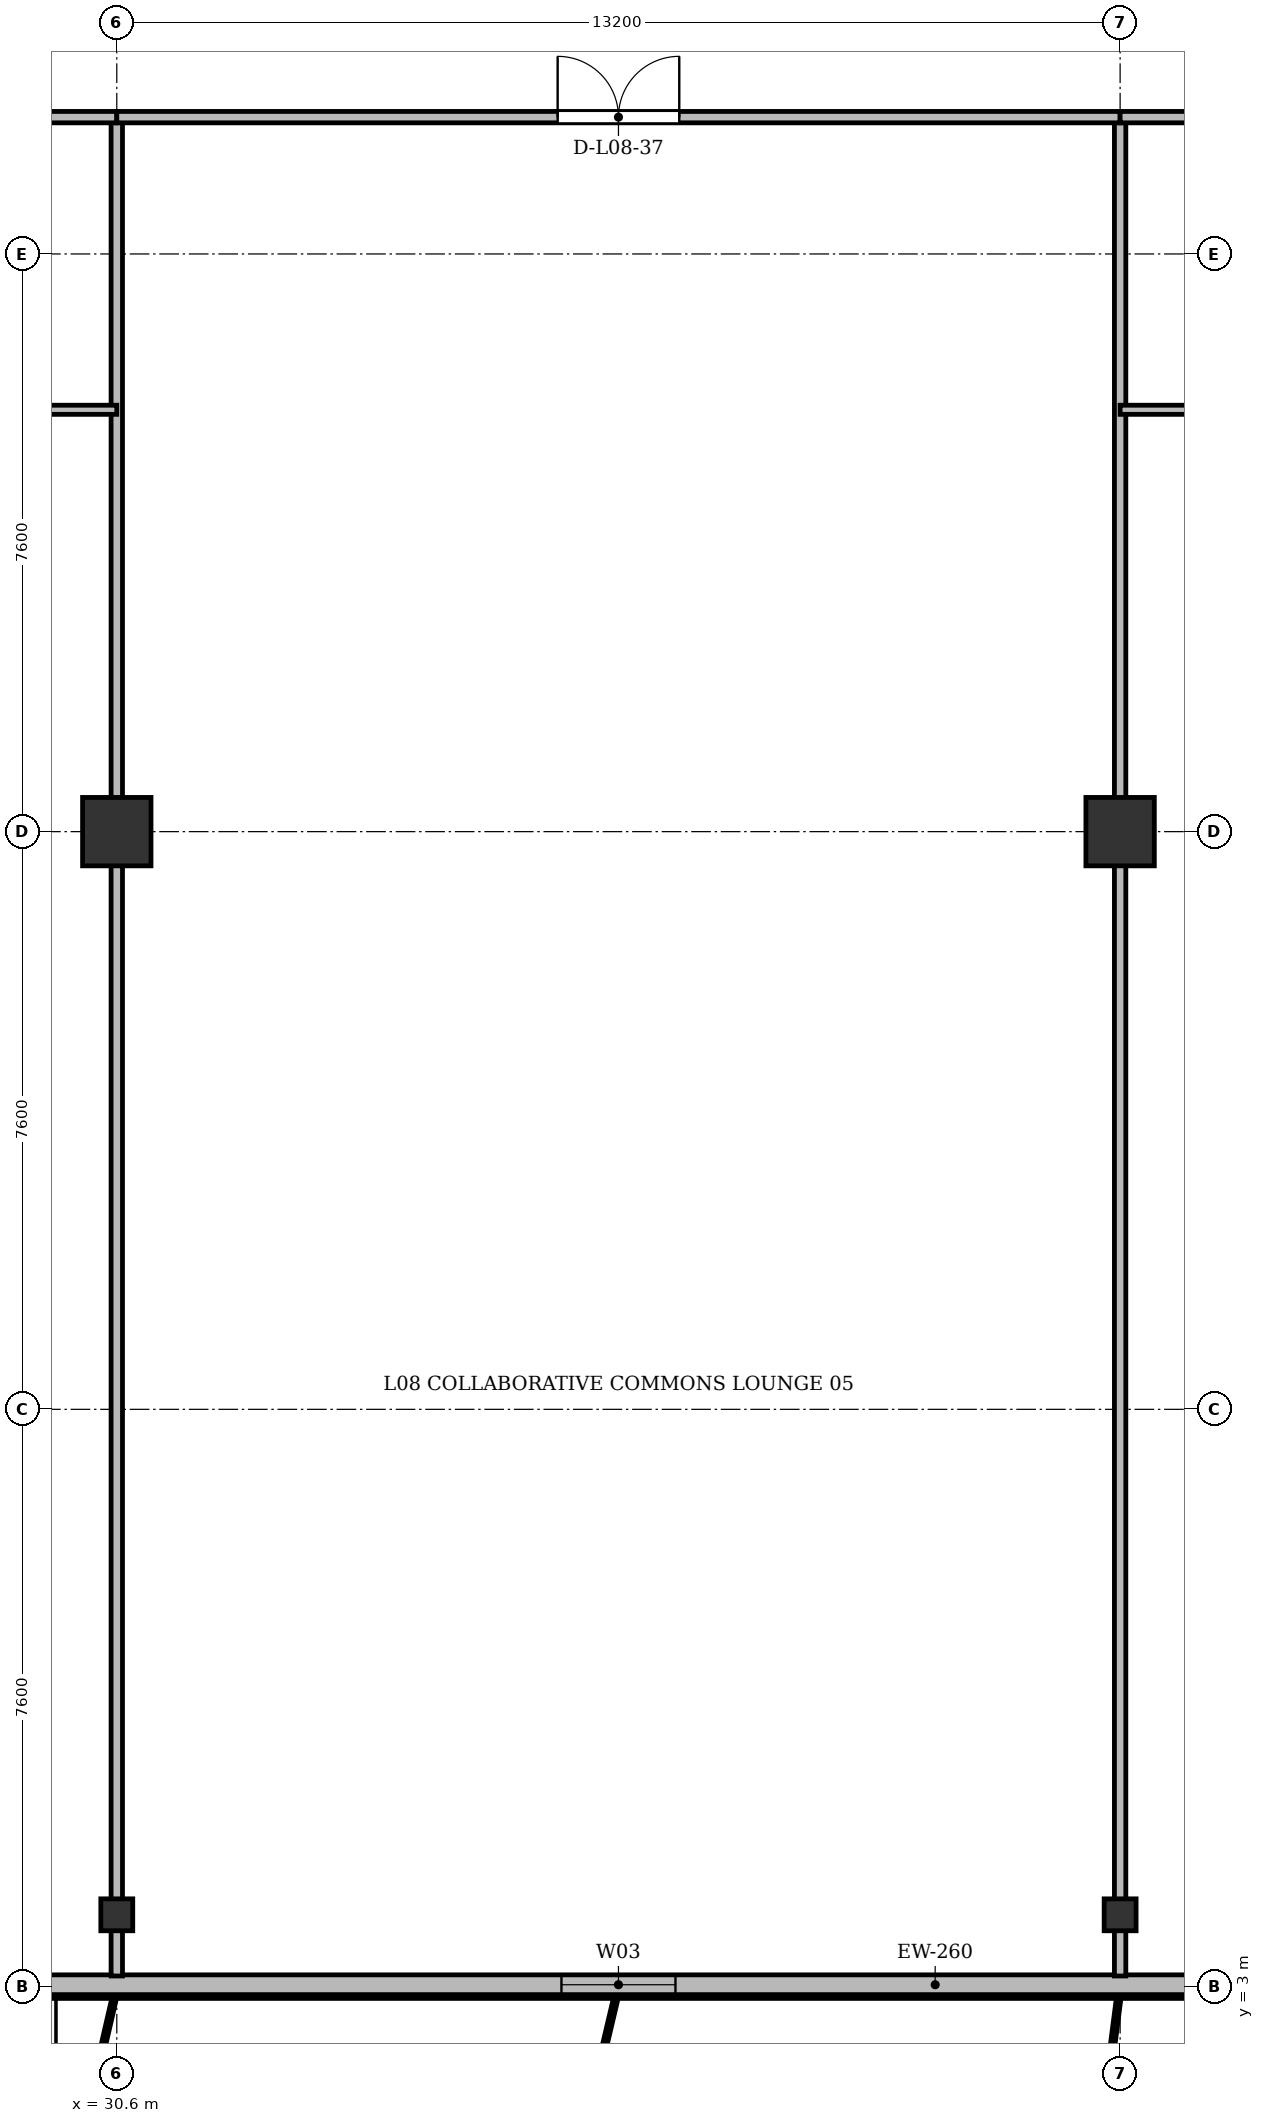
"""IFC4 building model, lengths in metres.
Left out: names, types, materials, properties, quantities, classifications, styles, units other than length and angle.
Written with IfcOpenShell. Run it as: python <this file> out.ifc"""

import sys

from ifc_helpers import new_model, si_unit, direction, frame, frame_2d, origin, origin_2d, place, context, subcontext, project, spatial, rectangle, i_section, extrude, source, transform, mapped, element, fill, save


model = new_model("IFC4")
c1 = context("Model", 3, precision=1e-05, world=origin(), true_north=direction((0.0, 1.0)))
c2 = subcontext(c1, "Body", "Model", "MODEL_VIEW")
j1 = project(units=[si_unit("LENGTHUNIT", "METRE"), si_unit("PLANEANGLEUNIT", "RADIAN")], contexts=[c1])
p1 = place(None, origin())
s1 = spatial("IfcSite", under=j1, at=p1, CompositionType="ELEMENT")
p2 = place(p1, origin())
s2 = spatial("IfcBuilding", under=s1, at=p2, CompositionType="ELEMENT")
p3 = place(p2, frame((0.0, 0.0, 34.3)))
s3 = spatial("IfcBuildingStorey", under=s2, at=p3, CompositionType="ELEMENT", Elevation=34.3)
m1 = source(origin(), c2, "Body", "SweptSolid", [
    extrude(i_section(OverallWidth=0.42, OverallDepth=0.42, WebThickness=0.026, FlangeThickness=0.04, at=origin_2d()), origin(), (0.0, 0.0, 1.0), 3.6),
])
p4 = place(p3, frame((30.6, 3.95, 0.0), z_axis=(0.0, 0.0, 1.0), x_axis=(1.0, 0.0, 0.0)))
e1 = element("IfcColumn", 1, at=p4, inside=s3, PredefinedType="COLUMN", context=c2, shape_type="MappedRepresentation", body=[
    mapped(m1, transform((0.0, 0.0, 0.0), x_axis=(1.0, 0.0, 0.0), y_axis=(0.0, 1.0, 0.0), z_axis=(0.0, 0.0, 1.0), scale=1.0)),
])
m2 = source(origin(), c2, "Body", "SweptSolid", [
    extrude(rectangle(XDim=0.9, YDim=0.9, at=origin_2d()), origin(), (0.0, 0.0, 1.0), 3.6),
])
p5 = place(p3, frame((30.6, 18.2, 0.0), z_axis=(0.0, 0.0, 1.0), x_axis=(1.0, 0.0, 0.0)))
e2 = element("IfcColumn", 2, at=p5, inside=s3, PredefinedType="COLUMN", context=c2, shape_type="MappedRepresentation", body=[
    mapped(m2, transform((0.0, 0.0, 0.0), x_axis=(1.0, 0.0, 0.0), y_axis=(0.0, 1.0, 0.0), z_axis=(0.0, 0.0, 1.0), scale=1.0)),
])
p6 = place(p3, frame((43.8, 3.95, 0.0), z_axis=(0.0, 0.0, 1.0), x_axis=(1.0, 0.0, 0.0)))
e3 = element("IfcColumn", 3, at=p6, inside=s3, PredefinedType="COLUMN", context=c2, shape_type="MappedRepresentation", body=[
    mapped(m1, transform((0.0, 0.0, 0.0), x_axis=(1.0, 0.0, 0.0), y_axis=(0.0, 1.0, 0.0), z_axis=(0.0, 0.0, 1.0), scale=1.0)),
])
p7 = place(p3, frame((43.8, 18.2, 0.0), z_axis=(0.0, 0.0, 1.0), x_axis=(1.0, 0.0, 0.0)))
e4 = element("IfcColumn", 4, at=p7, inside=s3, PredefinedType="COLUMN", context=c2, shape_type="MappedRepresentation", body=[
    mapped(m2, transform((0.0, 0.0, 0.0), x_axis=(1.0, 0.0, 0.0), y_axis=(0.0, 1.0, 0.0), z_axis=(0.0, 0.0, 1.0), scale=1.0)),
])
p8 = place(p3, frame((66.9, 3.03, 0.0), z_axis=(0.0, 0.0, 1.0), x_axis=(-1.0, 0.0, 0.0)))
e5 = element("IfcWall", 5, at=p8, inside=s3, PredefinedType="SOLIDWALL", context=c2, shape_type="SweptSolid", body=[
    extrude(rectangle(XDim=59.4, YDim=0.26, at=frame_2d((29.7, 0.0))), origin(), (0.0, 0.0, 1.0), 3.34),
])
p9 = place(p8, frame((3.875, 0.0, 0.9)))
e6 = element("IfcOpeningElement", 6, at=p9, cuts=e5, PredefinedType="OPENING", context=c2, shape_type="SweptSolid", body=[
    extrude(rectangle(XDim=1.65, YDim=1.85, at=frame_2d((0.825, 0.925))), frame((0.0, 0.14, 0.0), z_axis=(0.0, -1.0, 0.0), x_axis=(1.0, 0.0, 0.0)), (0.0, 0.0, 1.0), 0.28),
])
p10 = place(p8, frame((9.565, 0.0, 0.0)))
e7 = element("IfcOpeningElement", 7, at=p10, cuts=e5, PredefinedType="OPENING", context=c2, shape_type="SweptSolid", body=[
    extrude(rectangle(XDim=1.2, YDim=2.2, at=frame_2d((0.6, 1.1))), frame((0.0, 0.14, 0.0), z_axis=(0.0, -1.0, 0.0), x_axis=(1.0, 0.0, 0.0)), (0.0, 0.0, 1.0), 0.28),
])
p11 = place(p8, frame((18.4, 0.0, 0.9)))
e8 = element("IfcOpeningElement", 8, at=p11, cuts=e5, PredefinedType="OPENING", context=c2, shape_type="SweptSolid", body=[
    extrude(rectangle(XDim=2.2, YDim=1.8, at=frame_2d((1.1, 0.9))), frame((0.0, 0.14, 0.0), z_axis=(0.0, -1.0, 0.0), x_axis=(1.0, 0.0, 0.0)), (0.0, 0.0, 1.0), 0.28),
])
p12 = place(p8, frame((28.95, 0.0, 0.9)))
e9 = element("IfcOpeningElement", 9, at=p12, cuts=e5, PredefinedType="OPENING", context=c2, shape_type="SweptSolid", body=[
    extrude(rectangle(XDim=1.5, YDim=1.75, at=frame_2d((0.75, 0.875))), frame((0.0, 0.14, 0.0), z_axis=(0.0, -1.0, 0.0), x_axis=(1.0, 0.0, 0.0)), (0.0, 0.0, 1.0), 0.28),
])
p13 = place(p8, frame((40.301, 0.0, 0.0)))
e10 = element("IfcOpeningElement", 10, at=p13, cuts=e5, PredefinedType="OPENING", context=c2, shape_type="SweptSolid", body=[
    extrude(rectangle(XDim=1.2, YDim=2.2, at=frame_2d((0.6, 1.1))), frame((0.0, 0.14, 0.0), z_axis=(0.0, -1.0, 0.0), x_axis=(1.0, 0.0, 0.0)), (0.0, 0.0, 1.0), 0.28),
])
p14 = place(p8, frame((46.575, 0.0, 0.9)))
e11 = element("IfcOpeningElement", 11, at=p14, cuts=e5, PredefinedType="OPENING", context=c2, shape_type="SweptSolid", body=[
    extrude(rectangle(XDim=1.65, YDim=1.85, at=frame_2d((0.825, 0.925))), frame((0.0, 0.14, 0.0), z_axis=(0.0, -1.0, 0.0), x_axis=(1.0, 0.0, 0.0)), (0.0, 0.0, 1.0), 0.28),
])
p15 = place(p8, frame((55.817, 0.0, 0.0)))
e12 = element("IfcOpeningElement", 12, at=p15, cuts=e5, PredefinedType="OPENING", context=c2, shape_type="SweptSolid", body=[
    extrude(rectangle(XDim=1.2, YDim=2.2, at=frame_2d((0.6, 1.1))), frame((0.0, 0.14, 0.0), z_axis=(0.0, -1.0, 0.0), x_axis=(1.0, 0.0, 0.0)), (0.0, 0.0, 1.0), 0.28),
])
for number, where, z_axis, x_axis in (
    (13, (30.6, 3.145, 0.0), (0.0, 0.0, 1.0), (0.0, 1.0, 0.0)),
    (14, (43.8, 3.145, 0.0), (0.0, 0.0, 1.0), (0.0, 1.0, 0.0)),
):
    element("IfcWall", number, at=place(p3, frame(where, z_axis=z_axis, x_axis=x_axis)), inside=s3, PredefinedType="PARTITIONING", context=c2, shape_type="SweptSolid", body=[
        extrude(rectangle(XDim=24.455, YDim=0.15, at=frame_2d((12.228, 0.0))), origin(), (0.0, 0.0, 1.0), 2.752),
    ])
p16 = place(p3, frame((23.4, 27.6, 0.0), z_axis=(0.0, 0.0, 1.0), x_axis=(1.0, 0.0, 0.0)))
e15 = element("IfcWall", 15, at=p16, inside=s3, PredefinedType="PARTITIONING", context=c2, shape_type="SweptSolid", body=[
    extrude(rectangle(XDim=7.2, YDim=0.15, at=frame_2d((3.6, 0.0))), origin(), (0.0, 0.0, 1.0), 2.752),
])
p17 = place(p16, frame((3.125, 0.0, 0.0)))
e16 = element("IfcOpeningElement", 16, at=p17, cuts=e15, PredefinedType="OPENING", context=c2, shape_type="SweptSolid", body=[
    extrude(rectangle(XDim=0.95, YDim=2.15, at=frame_2d((0.475, 1.075))), frame((0.0, 0.085, 0.0), z_axis=(0.0, -1.0, 0.0), x_axis=(1.0, 0.0, 0.0)), (0.0, 0.0, 1.0), 0.17),
])
p18 = place(p3, frame((23.4, 23.75, 0.0), z_axis=(0.0, 0.0, 1.0), x_axis=(1.0, 0.0, 0.0)))
e17 = element("IfcWall", 17, at=p18, inside=s3, PredefinedType="PARTITIONING", context=c2, shape_type="SweptSolid", body=[
    extrude(rectangle(XDim=7.2, YDim=0.12, at=frame_2d((3.6, 0.0))), origin(), (0.0, 0.0, 1.0), 2.752),
])
p19 = place(p18, frame((3.125, 0.0, 0.0)))
e18 = element("IfcOpeningElement", 18, at=p19, cuts=e17, PredefinedType="OPENING", context=c2, shape_type="SweptSolid", body=[
    extrude(rectangle(XDim=0.95, YDim=2.15, at=frame_2d((0.475, 1.075))), frame((0.0, 0.07, 0.0), z_axis=(0.0, -1.0, 0.0), x_axis=(1.0, 0.0, 0.0)), (0.0, 0.0, 1.0), 0.14),
])
p20 = place(p3, frame((30.6, 27.6, 0.0), z_axis=(0.0, 0.0, 1.0), x_axis=(1.0, 0.0, 0.0)))
e19 = element("IfcWall", 19, at=p20, inside=s3, PredefinedType="PARTITIONING", context=c2, shape_type="SweptSolid", body=[
    extrude(rectangle(XDim=13.2, YDim=0.15, at=frame_2d((6.6, 0.0))), origin(), (0.0, 0.0, 1.0), 2.752),
])
p21 = place(p20, frame((5.8, 0.0, 0.0)))
e20 = element("IfcOpeningElement", 20, at=p21, cuts=e19, PredefinedType="OPENING", context=c2, shape_type="SweptSolid", body=[
    extrude(rectangle(XDim=1.6, YDim=2.2, at=frame_2d((0.8, 1.1))), frame((0.0, 0.085, 0.0), z_axis=(0.0, -1.0, 0.0), x_axis=(1.0, 0.0, 0.0)), (0.0, 0.0, 1.0), 0.17),
])
p22 = place(p3, frame((43.8, 27.6, 0.0), z_axis=(0.0, 0.0, 1.0), x_axis=(1.0, 0.0, 0.0)))
e21 = element("IfcWall", 21, at=p22, inside=s3, PredefinedType="PARTITIONING", context=c2, shape_type="SweptSolid", body=[
    extrude(rectangle(XDim=7.2, YDim=0.15, at=frame_2d((3.6, 0.0))), origin(), (0.0, 0.0, 1.0), 2.752),
])
p23 = place(p22, frame((3.125, 0.0, 0.0)))
e22 = element("IfcOpeningElement", 22, at=p23, cuts=e21, PredefinedType="OPENING", context=c2, shape_type="SweptSolid", body=[
    extrude(rectangle(XDim=0.95, YDim=2.15, at=frame_2d((0.475, 1.075))), frame((0.0, 0.085, 0.0), z_axis=(0.0, -1.0, 0.0), x_axis=(1.0, 0.0, 0.0)), (0.0, 0.0, 1.0), 0.17),
])
p24 = place(p3, frame((43.8, 23.75, 0.0), z_axis=(0.0, 0.0, 1.0), x_axis=(1.0, 0.0, 0.0)))
e23 = element("IfcWall", 23, at=p24, inside=s3, PredefinedType="PARTITIONING", context=c2, shape_type="SweptSolid", body=[
    extrude(rectangle(XDim=7.2, YDim=0.12, at=frame_2d((3.6, 0.0))), origin(), (0.0, 0.0, 1.0), 2.752),
])
p25 = place(p24, frame((3.125, 0.0, 0.0)))
e24 = element("IfcOpeningElement", 24, at=p25, cuts=e23, PredefinedType="OPENING", context=c2, shape_type="SweptSolid", body=[
    extrude(rectangle(XDim=0.95, YDim=2.15, at=frame_2d((0.475, 1.075))), frame((0.0, 0.07, 0.0), z_axis=(0.0, -1.0, 0.0), x_axis=(1.0, 0.0, 0.0)), (0.0, 0.0, 1.0), 0.14),
])
m3 = source(origin(), c2, "Body", "SweptSolid", [
    extrude(rectangle(XDim=1.5, YDim=1.75, at=frame_2d((0.75, 0.875))), frame((0.0, 0.03, 0.0), z_axis=(0.0, -1.0, 0.0), x_axis=(1.0, 0.0, 0.0)), (0.0, 0.0, 1.0), 0.06),
])
p26 = place(p12, origin())
e25 = element("IfcWindow", 25, at=p26, inside=s3, PartitioningType="SINGLE_PANEL", PredefinedType="WINDOW", context=c2, shape_type="MappedRepresentation", body=[
    mapped(m3, transform((0.0, 0.0, 0.0), x_axis=(1.0, 0.0, 0.0), y_axis=(0.0, 1.0, 0.0), z_axis=(0.0, 0.0, 1.0), scale=1.0)),
])
fill(e9, e25)
m4 = source(origin(), c2, "Body", "SweptSolid", [
    extrude(rectangle(XDim=1.6, YDim=2.2, at=frame_2d((0.8, 1.1))), frame((0.0, 0.025, 0.0), z_axis=(0.0, -1.0, 0.0), x_axis=(1.0, 0.0, 0.0)), (0.0, 0.0, 1.0), 0.05),
])
p27 = place(p21, origin())
e26 = element("IfcDoor", 26, at=p27, inside=s3, OperationType="DOUBLE_DOOR_SINGLE_SWING", PredefinedType="DOOR", context=c2, shape_type="MappedRepresentation", body=[
    mapped(m4, transform((0.0, 0.0, 0.0), x_axis=(1.0, 0.0, 0.0), y_axis=(0.0, 1.0, 0.0), z_axis=(0.0, 0.0, 1.0), scale=1.0)),
])
fill(e20, e26)
save(model, sys.argv[1])
